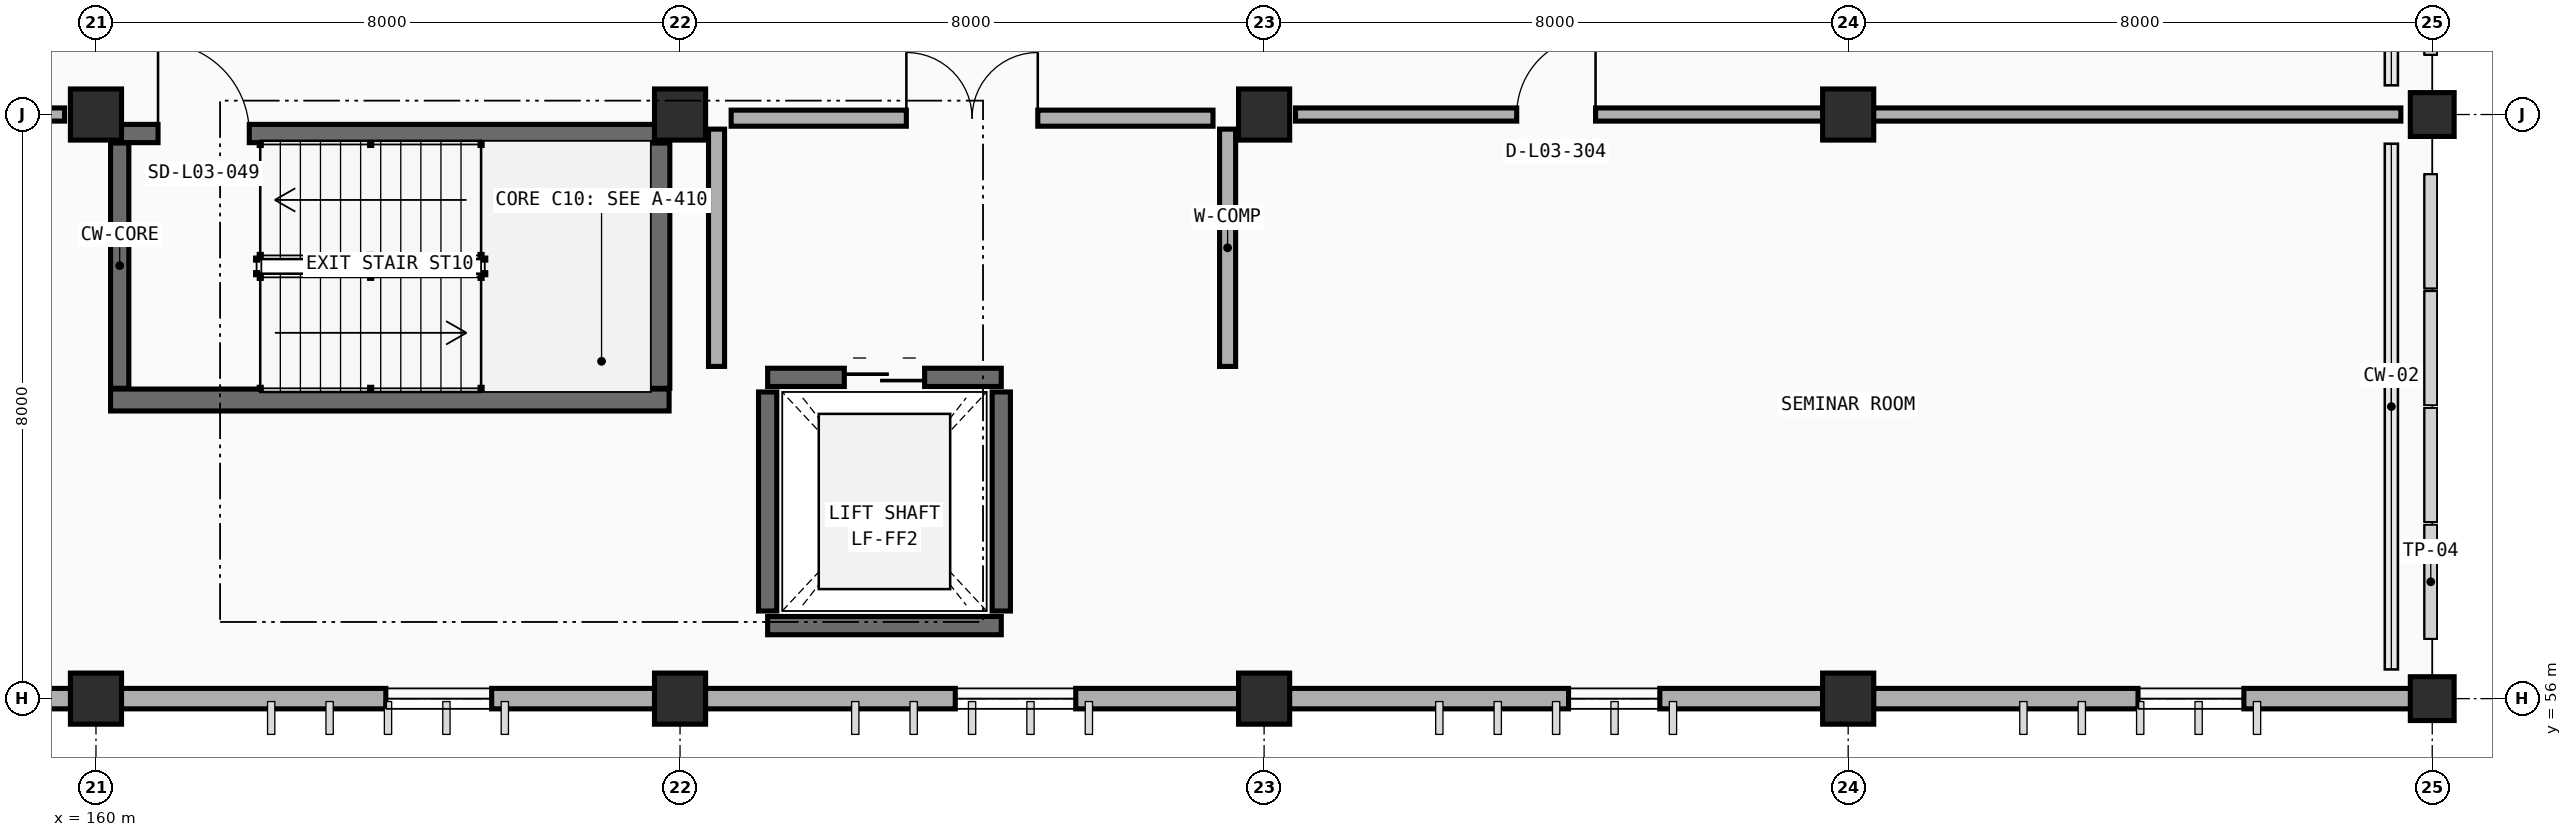
"""IFC4 building model, lengths in metres.
Left out: names, types, materials, properties, quantities, classifications, styles, units other than length and angle.
Written with IfcOpenShell. Run it as: python <this file> out.ifc"""

import sys

from ifc_helpers import new_model, si_unit, direction, frame, frame_2d, origin, origin_2d, place, context, subcontext, project, spatial, rectangle, extrude, element, fill, save


model = new_model("IFC4")
c1 = context("Model", 3, precision=1e-05, world=origin(), true_north=direction((0.0, 1.0)))
c2 = subcontext(c1, "Body", "Model", "MODEL_VIEW")
j1 = project(units=[si_unit("LENGTHUNIT", "METRE"), si_unit("PLANEANGLEUNIT", "RADIAN")], contexts=[c1])
p1 = place(None, origin())
s1 = spatial("IfcSite", under=j1, at=p1, CompositionType="ELEMENT")
p2 = place(p1, origin())
s2 = spatial("IfcBuilding", under=s1, at=p2, CompositionType="ELEMENT")
p3 = place(p2, frame((0.0, 0.0, 9.6)))
s3 = spatial("IfcBuildingStorey", under=s2, at=p3, CompositionType="ELEMENT", Elevation=9.6)
for number, where, z_axis, x_axis in (
    (1, (160.0, 56.0, 0.0), (0.0, 0.0, 1.0), (1.0, 0.0, 0.0)),
    (2, (168.0, 56.0, 0.0), (0.0, 0.0, 1.0), (1.0, 0.0, 0.0)),
    (3, (176.0, 56.0, 0.0), (0.0, 0.0, 1.0), (1.0, 0.0, 0.0)),
    (4, (184.0, 56.0, 0.0), (0.0, 0.0, 1.0), (1.0, 0.0, 0.0)),
):
    element("IfcColumn", number, at=place(p3, frame(where, z_axis=z_axis, x_axis=x_axis)), inside=s3, PredefinedType="COLUMN", context=c2, shape_type="SweptSolid", body=[
        extrude(rectangle(XDim=0.7, YDim=0.7, at=origin_2d()), origin(), (0.0, 0.0, 1.0), 4.2),
    ])
p4 = place(p3, frame((192.0, 56.0, 0.0), z_axis=(0.0, 0.0, 1.0), x_axis=(1.0, 0.0, 0.0)))
e5 = element("IfcColumn", 5, at=p4, inside=s3, PredefinedType="COLUMN", context=c2, shape_type="SweptSolid", body=[
    extrude(rectangle(XDim=0.6, YDim=0.6, at=origin_2d()), origin(), (0.0, 0.0, 1.0), 4.2),
])
for number, where, z_axis, x_axis in (
    (6, (160.0, 64.0, 0.0), (0.0, 0.0, 1.0), (1.0, 0.0, 0.0)),
    (7, (168.0, 64.0, 0.0), (0.0, 0.0, 1.0), (1.0, 0.0, 0.0)),
    (8, (176.0, 64.0, 0.0), (0.0, 0.0, 1.0), (1.0, 0.0, 0.0)),
    (9, (184.0, 64.0, 0.0), (0.0, 0.0, 1.0), (1.0, 0.0, 0.0)),
):
    element("IfcColumn", number, at=place(p3, frame(where, z_axis=z_axis, x_axis=x_axis)), inside=s3, PredefinedType="COLUMN", context=c2, shape_type="SweptSolid", body=[
        extrude(rectangle(XDim=0.7, YDim=0.7, at=origin_2d()), origin(), (0.0, 0.0, 1.0), 4.2),
    ])
p5 = place(p3, frame((192.0, 64.0, 0.0), z_axis=(0.0, 0.0, 1.0), x_axis=(1.0, 0.0, 0.0)))
e10 = element("IfcColumn", 10, at=p5, inside=s3, PredefinedType="COLUMN", context=c2, shape_type="SweptSolid", body=[
    extrude(rectangle(XDim=0.6, YDim=0.6, at=origin_2d()), origin(), (0.0, 0.0, 1.0), 4.2),
])
p6 = place(p3, frame((159.653, 56.0, 0.0), z_axis=(0.0, 0.0, 1.0), x_axis=(-1.0, 0.0, 0.0)))
e11 = element("IfcWall", 11, at=p6, inside=s3, PredefinedType="STANDARD", context=c2, shape_type="SweptSolid", body=[
    extrude(rectangle(XDim=7.306, YDim=0.28, at=frame_2d((3.653, 0.0))), origin(), (0.0, 0.0, 1.0), 3.325),
])
p7 = place(p6, frame((2.233, 0.0, 0.9)))
e12 = element("IfcOpeningElement", 12, at=p7, cuts=e11, PredefinedType="OPENING", context=c2, shape_type="SweptSolid", body=[
    extrude(rectangle(XDim=1.25, YDim=2.0, at=frame_2d((0.625, 1.0))), frame((0.0, 0.15, 0.0), z_axis=(0.0, -1.0, 0.0), x_axis=(1.0, 0.0, 0.0)), (0.0, 0.0, 1.0), 0.3),
])
p8 = place(p3, frame((167.653, 56.0, 0.0), z_axis=(0.0, 0.0, 1.0), x_axis=(-1.0, 0.0, 0.0)))
e13 = element("IfcWall", 13, at=p8, inside=s3, PredefinedType="STANDARD", context=c2, shape_type="SweptSolid", body=[
    extrude(rectangle(XDim=7.306, YDim=0.28, at=frame_2d((3.653, 0.0))), origin(), (0.0, 0.0, 1.0), 3.325),
])
p9 = place(p8, frame((2.233, 0.0, 0.9)))
e14 = element("IfcOpeningElement", 14, at=p9, cuts=e13, PredefinedType="OPENING", context=c2, shape_type="SweptSolid", body=[
    extrude(rectangle(XDim=1.45, YDim=2.0, at=frame_2d((0.725, 1.0))), frame((0.0, 0.15, 0.0), z_axis=(0.0, -1.0, 0.0), x_axis=(1.0, 0.0, 0.0)), (0.0, 0.0, 1.0), 0.3),
])
p10 = place(p3, frame((175.653, 56.0, 0.0), z_axis=(0.0, 0.0, 1.0), x_axis=(-1.0, 0.0, 0.0)))
e15 = element("IfcWall", 15, at=p10, inside=s3, PredefinedType="STANDARD", context=c2, shape_type="SweptSolid", body=[
    extrude(rectangle(XDim=7.306, YDim=0.28, at=frame_2d((3.653, 0.0))), origin(), (0.0, 0.0, 1.0), 3.325),
])
p11 = place(p10, frame((2.233, 0.0, 0.9)))
e16 = element("IfcOpeningElement", 16, at=p11, cuts=e15, PredefinedType="OPENING", context=c2, shape_type="SweptSolid", body=[
    extrude(rectangle(XDim=1.65, YDim=2.0, at=frame_2d((0.825, 1.0))), frame((0.0, 0.15, 0.0), z_axis=(0.0, -1.0, 0.0), x_axis=(1.0, 0.0, 0.0)), (0.0, 0.0, 1.0), 0.3),
])
p12 = place(p3, frame((183.653, 56.0, 0.0), z_axis=(0.0, 0.0, 1.0), x_axis=(-1.0, 0.0, 0.0)))
e17 = element("IfcWall", 17, at=p12, inside=s3, PredefinedType="STANDARD", context=c2, shape_type="SweptSolid", body=[
    extrude(rectangle(XDim=7.306, YDim=0.28, at=frame_2d((3.653, 0.0))), origin(), (0.0, 0.0, 1.0), 3.325),
])
p13 = place(p12, frame((2.233, 0.0, 0.9)))
e18 = element("IfcOpeningElement", 18, at=p13, cuts=e17, PredefinedType="OPENING", context=c2, shape_type="SweptSolid", body=[
    extrude(rectangle(XDim=1.25, YDim=2.0, at=frame_2d((0.625, 1.0))), frame((0.0, 0.15, 0.0), z_axis=(0.0, -1.0, 0.0), x_axis=(1.0, 0.0, 0.0)), (0.0, 0.0, 1.0), 0.3),
])
p14 = place(p3, frame((191.703, 56.0, 0.0), z_axis=(0.0, 0.0, 1.0), x_axis=(-1.0, 0.0, 0.0)))
e19 = element("IfcWall", 19, at=p14, inside=s3, PredefinedType="STANDARD", context=c2, shape_type="SweptSolid", body=[
    extrude(rectangle(XDim=7.356, YDim=0.28, at=frame_2d((3.678, 0.0))), origin(), (0.0, 0.0, 1.0), 3.325),
])
p15 = place(p14, frame((2.283, 0.0, 0.9)))
e20 = element("IfcOpeningElement", 20, at=p15, cuts=e19, PredefinedType="OPENING", context=c2, shape_type="SweptSolid", body=[
    extrude(rectangle(XDim=1.45, YDim=2.0, at=frame_2d((0.725, 1.0))), frame((0.0, 0.15, 0.0), z_axis=(0.0, -1.0, 0.0), x_axis=(1.0, 0.0, 0.0)), (0.0, 0.0, 1.0), 0.3),
])
for number, where, z_axis, x_axis in (
    (21, (191.76, 56.22, 0.0), (0.0, 0.0, 1.0), (-1.0, 0.0, 0.0)),
    (22, (191.76, 63.78, 0.0), (0.0, 0.0, 1.0), (-1.0, 0.0, 0.0)),
    (23, (191.76, 64.22, 0.0), (0.0, 0.0, 1.0), (-1.0, 0.0, 0.0)),
):
    element("IfcWall", number, at=place(p3, frame(where, z_axis=z_axis, x_axis=x_axis)), inside=s3, PredefinedType="PARAPET", context=c2, shape_type="SweptSolid", body=[
        extrude(rectangle(XDim=0.32, YDim=0.2, at=frame_2d((0.16, 0.0))), origin(), (0.0, 0.0, 1.0), 3.35),
    ])
p16 = place(p3, frame((160.2, 60.09, 0.0), z_axis=(0.0, 0.0, 1.0), x_axis=(1.0, 0.0, 0.0)))
e24 = element("IfcWall", 24, at=p16, inside=s3, PredefinedType="SHEAR", context=c2, shape_type="SweptSolid", body=[
    extrude(rectangle(XDim=7.65, YDim=0.3, at=frame_2d((3.825, 0.0))), origin(), (0.0, 0.0, 1.0), 4.2),
])
p17 = place(p3, frame((167.71, 60.25, 0.0), z_axis=(0.0, 0.0, 1.0), x_axis=(0.0, 1.0, 0.0)))
e25 = element("IfcWall", 25, at=p17, inside=s3, PredefinedType="SHEAR", context=c2, shape_type="SweptSolid", body=[
    extrude(rectangle(XDim=3.36, YDim=0.3, at=frame_2d((1.68, 0.0))), origin(), (0.0, 0.0, 1.0), 4.2),
])
p18 = place(p3, frame((160.2, 63.74, 0.0), z_axis=(0.0, 0.0, 1.0), x_axis=(1.0, 0.0, 0.0)))
e26 = element("IfcWall", 26, at=p18, inside=s3, PredefinedType="SOLIDWALL", context=c2, shape_type="SweptSolid", body=[
    extrude(rectangle(XDim=7.65, YDim=0.25, at=frame_2d((3.825, 0.0))), origin(), (0.0, 0.0, 1.0), 4.2),
])
p19 = place(p18, frame((0.65, 0.0, 0.0)))
e27 = element("IfcOpeningElement", 27, at=p19, cuts=e26, PredefinedType="OPENING", context=c2, shape_type="SweptSolid", body=[
    extrude(rectangle(XDim=1.25, YDim=2.15, at=frame_2d((0.625, 1.075))), frame((0.0, 0.135, 0.0), z_axis=(0.0, -1.0, 0.0), x_axis=(1.0, 0.0, 0.0)), (0.0, 0.0, 1.0), 0.27),
])
p20 = place(p3, frame((160.325, 60.25, 0.0), z_axis=(0.0, 0.0, 1.0), x_axis=(0.0, 1.0, 0.0)))
e28 = element("IfcWall", 28, at=p20, inside=s3, PredefinedType="SOLIDWALL", context=c2, shape_type="SweptSolid", body=[
    extrude(rectangle(XDim=3.36, YDim=0.25, at=frame_2d((1.68, 0.0))), origin(), (0.0, 0.0, 1.0), 4.2),
])
p21 = place(p3, frame((169.2, 57.0, 0.0), z_axis=(0.0, 0.0, 1.0), x_axis=(1.0, 0.0, 0.0)))
e29 = element("IfcWall", 29, at=p21, inside=s3, PredefinedType="SOLIDWALL", context=c2, shape_type="SweptSolid", body=[
    extrude(rectangle(XDim=3.2, YDim=0.25, at=frame_2d((1.6, 0.0))), origin(), (0.0, 0.0, 1.0), 4.2),
])
p22 = place(p3, frame((169.2, 60.4, 0.0), z_axis=(0.0, 0.0, 1.0), x_axis=(1.0, 0.0, 0.0)))
e30 = element("IfcWall", 30, at=p22, inside=s3, PredefinedType="SOLIDWALL", context=c2, shape_type="SweptSolid", body=[
    extrude(rectangle(XDim=3.2, YDim=0.25, at=frame_2d((1.6, 0.0))), origin(), (0.0, 0.0, 1.0), 4.2),
])
p23 = place(p22, frame((1.05, 0.0, 0.0)))
e31 = element("IfcOpeningElement", 31, at=p23, cuts=e30, PredefinedType="OPENING", context=c2, shape_type="SweptSolid", body=[
    extrude(rectangle(XDim=1.1, YDim=2.15, at=frame_2d((0.55, 1.075))), frame((0.0, 0.135, 0.0), z_axis=(0.0, -1.0, 0.0), x_axis=(1.0, 0.0, 0.0)), (0.0, 0.0, 1.0), 0.27),
])
for number, where, z_axis, x_axis in (
    (32, (169.2, 57.2, 0.0), (0.0, 0.0, 1.0), (0.0, 1.0, 0.0)),
    (33, (172.4, 57.2, 0.0), (0.0, 0.0, 1.0), (0.0, 1.0, 0.0)),
):
    element("IfcWall", number, at=place(p3, frame(where, z_axis=z_axis, x_axis=x_axis)), inside=s3, PredefinedType="SOLIDWALL", context=c2, shape_type="SweptSolid", body=[
        extrude(rectangle(XDim=3.0, YDim=0.25, at=frame_2d((1.5, 0.0))), origin(), (0.0, 0.0, 1.0), 4.2),
    ])
p24 = place(p3, frame((168.7, 63.95, 0.0), z_axis=(0.0, 0.0, 1.0), x_axis=(1.0, 0.0, 0.0)))
e34 = element("IfcWall", 34, at=p24, inside=s3, PredefinedType="PARTITIONING", context=c2, shape_type="SweptSolid", body=[
    extrude(rectangle(XDim=6.6, YDim=0.22, at=frame_2d((3.3, 0.0))), origin(), (0.0, 0.0, 1.0), 3.275),
])
p25 = place(p24, frame((2.4, 0.0, 0.0)))
e35 = element("IfcOpeningElement", 35, at=p25, cuts=e34, PredefinedType="OPENING", context=c2, shape_type="SweptSolid", body=[
    extrude(rectangle(XDim=1.8, YDim=2.2, at=frame_2d((0.9, 1.1))), frame((0.0, 0.12, 0.0), z_axis=(0.0, -1.0, 0.0), x_axis=(1.0, 0.0, 0.0)), (0.0, 0.0, 1.0), 0.24),
])
for number, where, z_axis, x_axis in (
    (36, (168.5, 60.55, 0.0), (0.0, 0.0, 1.0), (0.0, 1.0, 0.0)),
    (37, (175.5, 60.55, 0.0), (0.0, 0.0, 1.0), (0.0, 1.0, 0.0)),
):
    element("IfcWall", number, at=place(p3, frame(where, z_axis=z_axis, x_axis=x_axis)), inside=s3, PredefinedType="PARTITIONING", context=c2, shape_type="SweptSolid", body=[
        extrude(rectangle(XDim=3.25, YDim=0.22, at=frame_2d((1.625, 0.0))), origin(), (0.0, 0.0, 1.0), 3.225),
    ])
p26 = place(p3, frame((136.43, 64.0, 0.0), z_axis=(0.0, 0.0, 1.0), x_axis=(1.0, 0.0, 0.0)))
e38 = element("IfcWall", 38, at=p26, inside=s3, PredefinedType="PARTITIONING", context=c2, shape_type="SweptSolid", body=[
    extrude(rectangle(XDim=23.14, YDim=0.18, at=frame_2d((11.57, 0.0))), origin(), (0.0, 0.0, 1.0), 3.275),
])
p27 = place(p26, frame((2.8, 0.0, 0.0)))
e39 = element("IfcOpeningElement", 39, at=p27, cuts=e38, PredefinedType="OPENING", context=c2, shape_type="SweptSolid", body=[
    extrude(rectangle(XDim=1.54, YDim=2.2, at=frame_2d((0.77, 1.1))), frame((0.0, 0.1, 0.0), z_axis=(0.0, -1.0, 0.0), x_axis=(1.0, 0.0, 0.0)), (0.0, 0.0, 1.0), 0.2),
])
p28 = place(p3, frame((176.43, 64.0, 0.0), z_axis=(0.0, 0.0, 1.0), x_axis=(1.0, 0.0, 0.0)))
e40 = element("IfcWall", 40, at=p28, inside=s3, PredefinedType="PARTITIONING", context=c2, shape_type="SweptSolid", body=[
    extrude(rectangle(XDim=15.14, YDim=0.18, at=frame_2d((7.57, 0.0))), origin(), (0.0, 0.0, 1.0), 3.275),
])
p29 = place(p28, frame((3.03, 0.0, 0.0)))
e41 = element("IfcOpeningElement", 41, at=p29, cuts=e40, PredefinedType="OPENING", context=c2, shape_type="SweptSolid", body=[
    extrude(rectangle(XDim=1.08, YDim=2.15, at=frame_2d((0.54, 1.075))), frame((0.0, 0.1, 0.0), z_axis=(0.0, -1.0, 0.0), x_axis=(1.0, 0.0, 0.0)), (0.0, 0.0, 1.0), 0.2),
])
p30 = place(p9, origin())
e42 = element("IfcWindow", 42, at=p30, inside=s3, PartitioningType="SINGLE_PANEL", PredefinedType="WINDOW", context=c2, shape_type="SweptSolid", body=[
    extrude(rectangle(XDim=1.45, YDim=2.0, at=frame_2d((0.725, 1.0))), frame((0.0, 0.03, 0.0), z_axis=(0.0, -1.0, 0.0), x_axis=(1.0, 0.0, 0.0)), (0.0, 0.0, 1.0), 0.06),
])
fill(e14, e42)
p31 = place(p11, origin())
e43 = element("IfcWindow", 43, at=p31, inside=s3, PartitioningType="DOUBLE_PANEL_VERTICAL", PredefinedType="WINDOW", context=c2, shape_type="SweptSolid", body=[
    extrude(rectangle(XDim=1.65, YDim=2.0, at=frame_2d((0.825, 1.0))), frame((0.0, 0.03, 0.0), z_axis=(0.0, -1.0, 0.0), x_axis=(1.0, 0.0, 0.0)), (0.0, 0.0, 1.0), 0.06),
])
fill(e16, e43)
p32 = place(p13, origin())
e44 = element("IfcWindow", 44, at=p32, inside=s3, PartitioningType="SINGLE_PANEL", PredefinedType="WINDOW", context=c2, shape_type="SweptSolid", body=[
    extrude(rectangle(XDim=1.25, YDim=2.0, at=frame_2d((0.625, 1.0))), frame((0.0, 0.03, 0.0), z_axis=(0.0, -1.0, 0.0), x_axis=(1.0, 0.0, 0.0)), (0.0, 0.0, 1.0), 0.06),
])
fill(e18, e44)
p33 = place(p15, origin())
e45 = element("IfcWindow", 45, at=p33, inside=s3, PartitioningType="SINGLE_PANEL", PredefinedType="WINDOW", context=c2, shape_type="SweptSolid", body=[
    extrude(rectangle(XDim=1.45, YDim=2.0, at=frame_2d((0.725, 1.0))), frame((0.0, 0.03, 0.0), z_axis=(0.0, -1.0, 0.0), x_axis=(1.0, 0.0, 0.0)), (0.0, 0.0, 1.0), 0.06),
])
fill(e20, e45)
p34 = place(p19, origin())
e46 = element("IfcDoor", 46, at=p34, inside=s3, OperationType="SINGLE_SWING_LEFT", PredefinedType="DOOR", context=c2, shape_type="SweptSolid", body=[
    extrude(rectangle(XDim=1.25, YDim=2.15, at=frame_2d((0.625, 1.075))), frame((0.0, 0.025, 0.0), z_axis=(0.0, -1.0, 0.0), x_axis=(1.0, 0.0, 0.0)), (0.0, 0.0, 1.0), 0.05),
])
fill(e27, e46)
p35 = place(p23, origin())
e47 = element("IfcDoor", 47, at=p35, inside=s3, OperationType="DOUBLE_DOOR_SLIDING", PredefinedType="DOOR", context=c2, shape_type="SweptSolid", body=[
    extrude(rectangle(XDim=1.1, YDim=2.15, at=frame_2d((0.55, 1.075))), frame((0.0, 0.025, 0.0), z_axis=(0.0, -1.0, 0.0), x_axis=(1.0, 0.0, 0.0)), (0.0, 0.0, 1.0), 0.05),
])
fill(e31, e47)
p36 = place(p25, origin())
e48 = element("IfcDoor", 48, at=p36, inside=s3, OperationType="DOUBLE_DOOR_SINGLE_SWING", PredefinedType="DOOR", context=c2, shape_type="SweptSolid", body=[
    extrude(rectangle(XDim=1.8, YDim=2.2, at=frame_2d((0.9, 1.1))), frame((0.0, 0.025, 0.0), z_axis=(0.0, -1.0, 0.0), x_axis=(1.0, 0.0, 0.0)), (0.0, 0.0, 1.0), 0.05),
])
fill(e35, e48)
p37 = place(p29, origin())
e49 = element("IfcDoor", 49, at=p37, inside=s3, OperationType="SINGLE_SWING_RIGHT", PredefinedType="DOOR", context=c2, shape_type="SweptSolid", body=[
    extrude(rectangle(XDim=1.08, YDim=2.15, at=frame_2d((0.54, 1.075))), frame((0.0, 0.025, 0.0), z_axis=(0.0, -1.0, 0.0), x_axis=(1.0, 0.0, 0.0)), (0.0, 0.0, 1.0), 0.05),
])
fill(e41, e49)
save(model, sys.argv[1])
